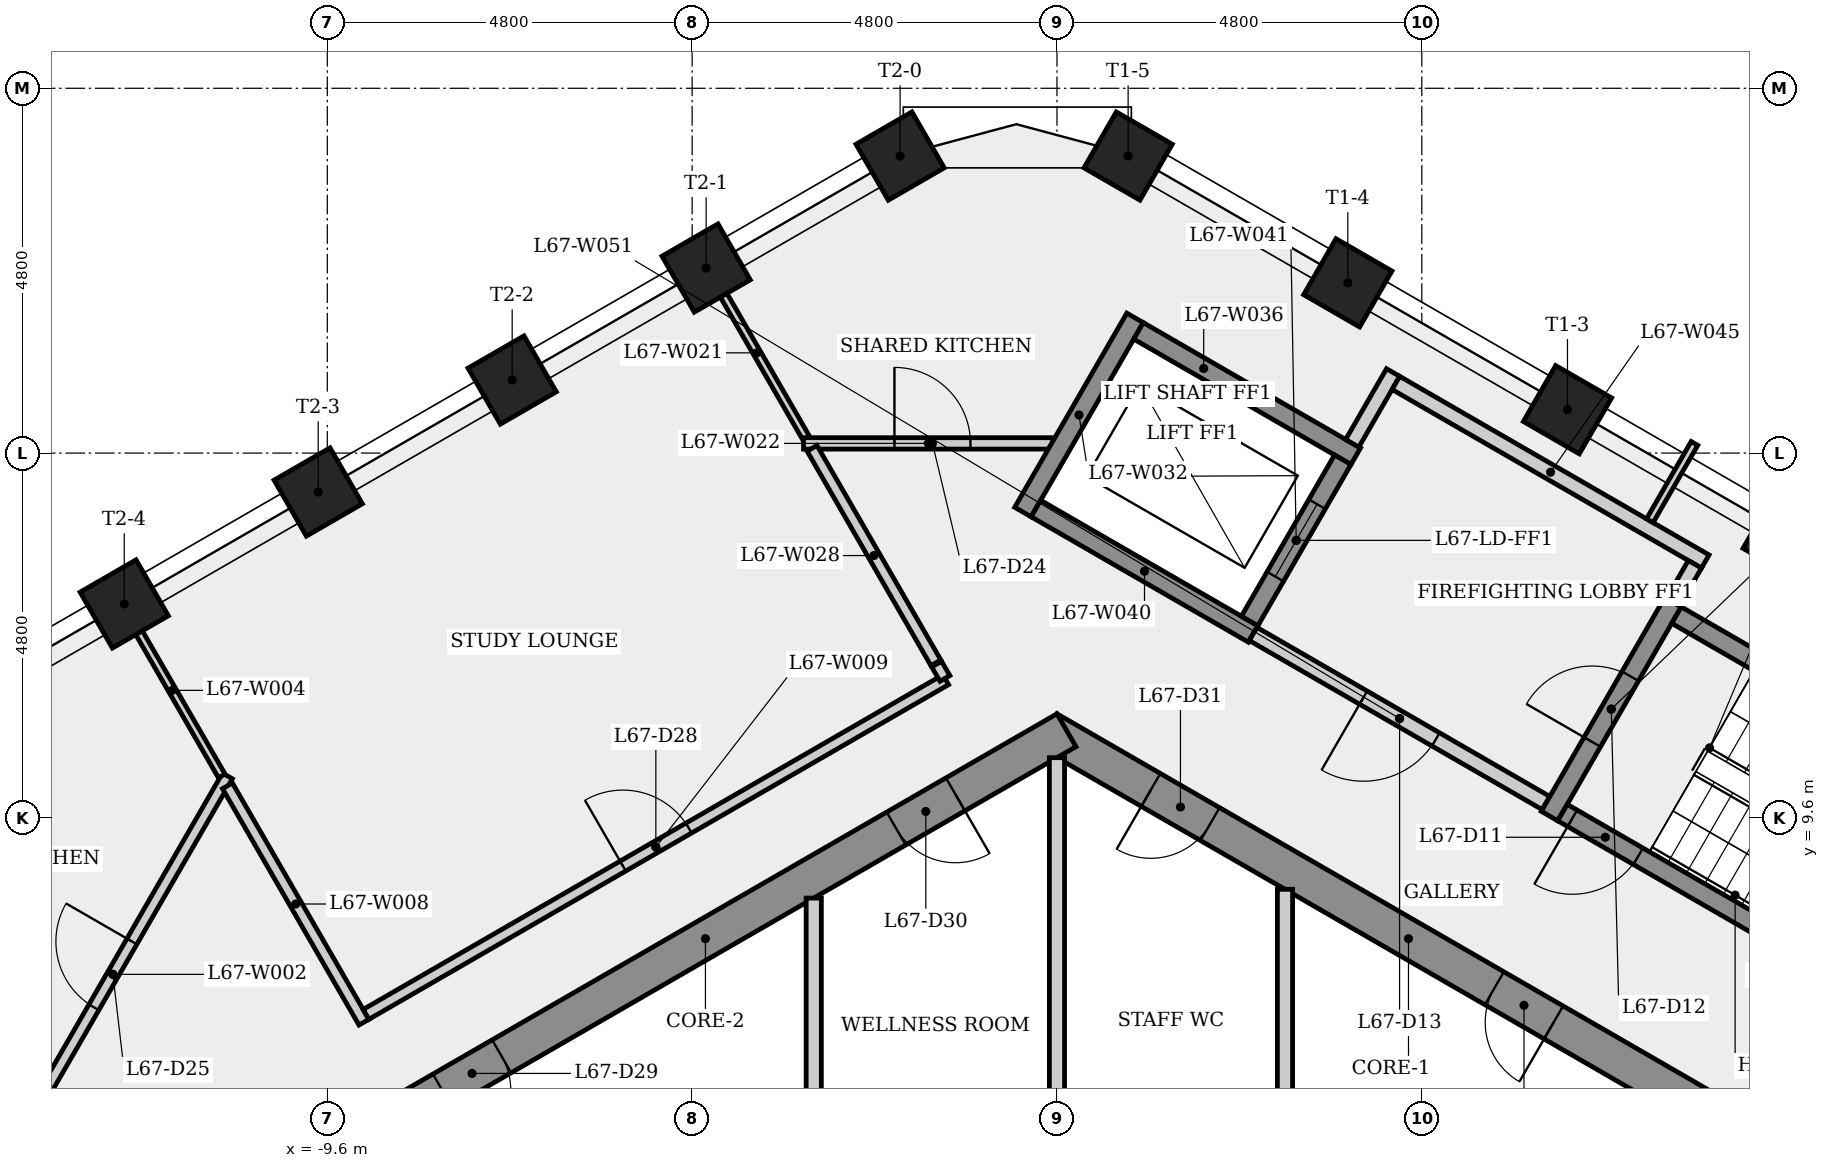
"""IFC4 building model, lengths in metres.
Left out: names, types, materials, properties, quantities, classifications, styles, units other than length and angle.
Written with IfcOpenShell. Run it as: python <this file> out.ifc"""

import sys

from ifc_helpers import new_model, si_unit, direction, frame, frame_2d, origin, origin_2d, place, context, subcontext, project, spatial, rectangle, extrude, element, fill, save


model = new_model("IFC4")
c1 = context("Model", 3, precision=1e-05, world=origin(), true_north=direction((0.0, 1.0)))
c2 = subcontext(c1, "Body", "Model", "MODEL_VIEW")
j1 = project(units=[si_unit("LENGTHUNIT", "METRE"), si_unit("PLANEANGLEUNIT", "RADIAN")], contexts=[c1])
p1 = place(None, origin())
s1 = spatial("IfcSite", under=j1, at=p1, CompositionType="ELEMENT")
p2 = place(p1, origin())
s2 = spatial("IfcBuilding", under=s1, at=p2, CompositionType="ELEMENT")
p3 = place(p2, frame((0.0, 0.0, 249.5)))
s3 = spatial("IfcBuildingStorey", under=s2, at=p3, CompositionType="ELEMENT", Elevation=249.5)
p4 = place(p3, frame((9.375, 5.268, 0.0), z_axis=(0.0, 0.0, 1.0), x_axis=(-0.866023993627, 0.500002442456, 0.0)))
e1 = element("IfcWall", 1, at=p4, inside=s3, PredefinedType="SHEAR", context=c2, shape_type="SweptSolid", body=[
    extrude(rectangle(XDim=10.97, YDim=0.5, at=frame_2d((5.485, 0.0))), origin(), (0.0, 0.0, 1.0), 3.4),
])
p5 = place(p4, frame((8.5, 0.0, 0.0)))
e2 = element("IfcOpeningElement", 2, at=p5, cuts=e1, PredefinedType="OPENING", context=c2, shape_type="SweptSolid", body=[
    extrude(rectangle(XDim=0.9, YDim=2.1, at=frame_2d((0.45, 1.05))), frame((0.0, 0.26, 0.0), z_axis=(0.0, -1.0, 0.0), x_axis=(1.0, 0.0, 0.0)), (0.0, 0.0, 1.0), 0.52),
])
p6 = place(p4, frame((3.28, 0.0, 0.0)))
e3 = element("IfcOpeningElement", 3, at=p6, cuts=e1, PredefinedType="OPENING", context=c2, shape_type="SweptSolid", body=[
    extrude(rectangle(XDim=0.9, YDim=2.1, at=frame_2d((0.45, 1.05))), frame((0.0, 0.26, 0.0), z_axis=(0.0, -1.0, 0.0), x_axis=(1.0, 0.0, 0.0)), (0.0, 0.0, 1.0), 0.52),
])
p7 = place(p3, frame((0.125, 10.753, 0.0), z_axis=(0.0, 0.0, 1.0), x_axis=(-0.866023993627, -0.500002442456, 0.0)))
e4 = element("IfcWall", 4, at=p7, inside=s3, PredefinedType="SHEAR", context=c2, shape_type="SweptSolid", body=[
    extrude(rectangle(XDim=10.97, YDim=0.5, at=frame_2d((5.485, 0.0))), origin(), (0.0, 0.0, 1.0), 3.4),
])
p8 = place(p7, frame((8.581, 0.0, 0.0)))
e5 = element("IfcOpeningElement", 5, at=p8, cuts=e4, PredefinedType="OPENING", context=c2, shape_type="SweptSolid", body=[
    extrude(rectangle(XDim=0.9, YDim=2.1, at=frame_2d((0.45, 1.05))), frame((0.0, 0.26, 0.0), z_axis=(0.0, -1.0, 0.0), x_axis=(1.0, 0.0, 0.0)), (0.0, 0.0, 1.0), 0.52),
])
p9 = place(p7, frame((1.687, 0.0, 0.0)))
e6 = element("IfcOpeningElement", 6, at=p9, cuts=e4, PredefinedType="OPENING", context=c2, shape_type="SweptSolid", body=[
    extrude(rectangle(XDim=0.9, YDim=2.1, at=frame_2d((0.45, 1.05))), frame((0.0, 0.26, 0.0), z_axis=(0.0, -1.0, 0.0), x_axis=(1.0, 0.0, 0.0)), (0.0, 0.0, 1.0), 0.52),
])
for number, where, z_axis, x_axis in (
    (7, (9.607, 13.302, 0.0), (0.0, 0.0, 1.0), (0.5, 0.866, 0.0)),
    (8, (6.717, 14.971, 0.0), (0.0, 0.0, 1.0), (0.5, 0.866, 0.0)),
    (9, (3.826, 16.64, 0.0), (0.0, 0.0, 1.0), (0.5, 0.866, 0.0)),
    (10, (0.936, 18.308, 0.0), (0.0, 0.0, 1.0), (0.5, 0.866, 0.0)),
    (11, (-2.064, 18.308, 0.0), (0.0, 0.0, 1.0), (-0.5, 0.866, 0.0)),
    (12, (-4.616, 16.835, 0.0), (0.0, 0.0, 1.0), (-0.5, 0.866, 0.0)),
    (13, (-7.168, 15.362, 0.0), (0.0, 0.0, 1.0), (-0.5, 0.866, 0.0)),
    (14, (-9.72, 13.888, 0.0), (0.0, 0.0, 1.0), (-0.5, 0.866, 0.0)),
    (15, (-12.272, 12.415, 0.0), (0.0, 0.0, 1.0), (-0.5, 0.866, 0.0)),
):
    element("IfcColumn", number, at=place(p3, frame(where, z_axis=z_axis, x_axis=x_axis)), inside=s3, PredefinedType="COLUMN", context=c2, shape_type="SweptSolid", body=[
        extrude(rectangle(XDim=0.85, YDim=0.85, at=origin_2d()), origin(), (0.0, 0.0, 1.0), 3.4),
    ])
p10 = place(p3, frame((-13.928, 4.931, 0.0), z_axis=(0.0, 0.0, 1.0), x_axis=(0.499980697609, 0.866036547738, 0.0)))
e16 = element("IfcWall", 16, at=p10, inside=s3, PredefinedType="PARTITIONING", context=c2, shape_type="SweptSolid", body=[
    extrude(rectangle(XDim=6.029, YDim=0.15, at=frame_2d((3.014, 0.0))), origin(), (0.0, 0.0, 1.0), 3.0),
])
p11 = place(p10, frame((2.514, 0.0, 0.0)))
e17 = element("IfcOpeningElement", 17, at=p11, cuts=e16, PredefinedType="OPENING", context=c2, shape_type="SweptSolid", body=[
    extrude(rectangle(XDim=1.0, YDim=2.1, at=frame_2d((0.5, 1.05))), frame((0.0, 0.085, 0.0), z_axis=(0.0, -1.0, 0.0), x_axis=(1.0, 0.0, 0.0)), (0.0, 0.0, 1.0), 0.17),
])
p12 = place(p3, frame((-12.29, 12.405, 0.0), z_axis=(0.0, 0.0, 1.0), x_axis=(0.500055541894, -0.865993334282, 0.0)))
e18 = element("IfcWall", 18, at=p12, inside=s3, PredefinedType="PARTITIONING", context=c2, shape_type="SweptSolid", body=[
    extrude(rectangle(XDim=2.601, YDim=0.1, at=frame_2d((1.301, 0.0))), origin(), (0.0, 0.0, 1.0), 3.0),
])
p13 = place(p3, frame((-10.914, 10.022, 0.0), z_axis=(0.0, 0.0, 1.0), x_axis=(0.499955890556, -0.866050868886, 0.0)))
e19 = element("IfcWall", 19, at=p13, inside=s3, PredefinedType="PARTITIONING", context=c2, shape_type="SweptSolid", body=[
    extrude(rectangle(XDim=3.591, YDim=0.15, at=frame_2d((1.795, 0.0))), origin(), (0.0, 0.0, 1.0), 3.0),
])
p14 = place(p3, frame((-9.091, 7.014, 0.0), z_axis=(0.0, 0.0, 1.0), x_axis=(0.866035548006, 0.499982429281, 0.0)))
e20 = element("IfcWall", 20, at=p14, inside=s3, PredefinedType="PARTITIONING", context=c2, shape_type="SweptSolid", body=[
    extrude(rectangle(XDim=8.806, YDim=0.15, at=frame_2d((4.403, 0.0))), origin(), (0.0, 0.0, 1.0), 3.0),
])
p15 = place(p14, frame((3.903, 0.0, 0.0)))
e21 = element("IfcOpeningElement", 21, at=p15, cuts=e20, PredefinedType="OPENING", context=c2, shape_type="SweptSolid", body=[
    extrude(rectangle(XDim=1.0, YDim=2.1, at=frame_2d((0.5, 1.05))), frame((0.0, 0.085, 0.0), z_axis=(0.0, -1.0, 0.0), x_axis=(1.0, 0.0, 0.0)), (0.0, 0.0, 1.0), 0.17),
])
p16 = place(p3, frame((-3.297, 14.593, 0.0), z_axis=(0.0, 0.0, 1.0), x_axis=(-0.499944513011, 0.866057436843, 0.0)))
e22 = element("IfcWall", 22, at=p16, inside=s3, PredefinedType="PARTITIONING", context=c2, shape_type="SweptSolid", body=[
    extrude(rectangle(XDim=2.601, YDim=0.1, at=frame_2d((1.301, 0.0))), origin(), (0.0, 0.0, 1.0), 3.0),
])
p17 = place(p3, frame((-3.335, 14.528, 0.0), z_axis=(0.0, 0.0, 1.0), x_axis=(1.0, 0.0, 0.0)))
e23 = element("IfcWall", 23, at=p17, inside=s3, PredefinedType="PARTITIONING", context=c2, shape_type="SweptSolid", body=[
    extrude(rectangle(XDim=3.283, YDim=0.15, at=frame_2d((1.642, 0.0))), origin(), (0.0, 0.0, 1.0), 3.0),
])
p18 = place(p17, frame((1.197, 0.0, 0.0)))
e24 = element("IfcOpeningElement", 24, at=p18, cuts=e23, PredefinedType="OPENING", context=c2, shape_type="SweptSolid", body=[
    extrude(rectangle(XDim=1.0, YDim=2.1, at=frame_2d((0.5, 1.05))), frame((0.0, 0.085, 0.0), z_axis=(0.0, -1.0, 0.0), x_axis=(1.0, 0.0, 0.0)), (0.0, 0.0, 1.0), 0.17),
])
p19 = place(p3, frame((-3.2, 8.545, 0.0), z_axis=(0.0, 0.0, 1.0), x_axis=(0.0, -1.0, 0.0)))
e25 = element("IfcWall", 25, at=p19, inside=s3, PredefinedType="PARTITIONING", context=c2, shape_type="SweptSolid", body=[
    extrude(rectangle(XDim=3.27, YDim=0.2, at=frame_2d((1.635, 0.0))), origin(), (0.0, 0.0, 1.0), 3.0),
])
p20 = place(p3, frame((-1.593, 11.641, 0.0), z_axis=(0.0, 0.0, 1.0), x_axis=(-0.500022939057, 0.866012159509, 0.0)))
e26 = element("IfcWall", 26, at=p20, inside=s3, PredefinedType="PARTITIONING", context=c2, shape_type="SweptSolid", body=[
    extrude(rectangle(XDim=3.259, YDim=0.15, at=frame_2d((1.629, 0.0))), origin(), (0.0, 0.0, 1.0), 3.0),
])
p21 = place(p3, frame((-1.583, 11.623, 0.0), z_axis=(0.0, 0.0, 1.0), x_axis=(0.500240224089, -0.865886665912, 0.0)))
e27 = element("IfcWall", 27, at=p21, inside=s3, PredefinedType="PARTITIONING", context=c2, shape_type="SweptSolid", body=[
    extrude(rectangle(XDim=0.218, YDim=0.15, at=frame_2d((0.109, 0.0))), origin(), (0.0, 0.0, 1.0), 3.0),
])
p22 = place(p3, frame((-0.448, 13.624, 0.0), z_axis=(0.0, 0.0, 1.0), x_axis=(0.500037662692, 0.866003658127, 0.0)))
e28 = element("IfcWall", 28, at=p22, inside=s3, PredefinedType="SHEAR", context=c2, shape_type="SweptSolid", body=[
    extrude(rectangle(XDim=2.95, YDim=0.25, at=frame_2d((1.475, 0.0))), origin(), (0.0, 0.0, 1.0), 3.0),
])
p23 = place(p3, frame((0.0, 10.392, 0.0), z_axis=(0.0, 0.0, 1.0), x_axis=(0.0, -1.0, 0.0)))
e29 = element("IfcWall", 29, at=p23, inside=s3, PredefinedType="PARTITIONING", context=c2, shape_type="SweptSolid", body=[
    extrude(rectangle(XDim=5.117, YDim=0.2, at=frame_2d((2.559, 0.0))), origin(), (0.0, 0.0, 1.0), 3.0),
])
for number, where, z_axis, x_axis in (
    (30, (1.073, 16.008, 0.0), (0.0, 0.0, 1.0), (0.866, -0.5, 0.0)),
    (31, (2.581, 12.02, 0.0), (0.0, 0.0, 1.0), (-0.866, 0.5, 0.0)),
):
    element("IfcWall", number, at=place(p3, frame(where, z_axis=z_axis, x_axis=x_axis)), inside=s3, PredefinedType="SHEAR", context=c2, shape_type="SweptSolid", body=[
        extrude(rectangle(XDim=3.3, YDim=0.25, at=frame_2d((1.65, 0.0))), origin(), (0.0, 0.0, 1.0), 3.0),
    ])
p24 = place(p3, frame((2.535, 12.191, 0.0), z_axis=(0.0, 0.0, 1.0), x_axis=(0.500061746146, 0.865989751695, 0.0)))
e32 = element("IfcWall", 32, at=p24, inside=s3, PredefinedType="SHEAR", context=c2, shape_type="SweptSolid", body=[
    extrude(rectangle(XDim=2.45, YDim=0.25, at=frame_2d((1.225, 0.0))), origin(), (0.0, 0.0, 1.0), 3.4),
])
p25 = place(p24, frame((0.675, 0.0, 0.0)))
e33 = element("IfcOpeningElement", 33, at=p25, cuts=e32, PredefinedType="OPENING", context=c2, shape_type="SweptSolid", body=[
    extrude(rectangle(XDim=1.1, YDim=2.1, at=frame_2d((0.55, 1.05))), frame((0.0, 0.135, 0.0), z_axis=(0.0, -1.0, 0.0), x_axis=(1.0, 0.0, 0.0)), (0.0, 0.0, 1.0), 0.27),
])
p26 = place(p3, frame((3.0, 8.66, 0.0), z_axis=(0.0, 0.0, 1.0), x_axis=(0.0, -1.0, 0.0)))
e34 = element("IfcWall", 34, at=p26, inside=s3, PredefinedType="PARTITIONING", context=c2, shape_type="SweptSolid", body=[
    extrude(rectangle(XDim=3.385, YDim=0.2, at=frame_2d((1.693, 0.0))), origin(), (0.0, 0.0, 1.0), 3.0),
])
p27 = place(p3, frame((3.885, 14.529, 0.0), z_axis=(0.0, 0.0, 1.0), x_axis=(0.499997628298, 0.866026773083, 0.0)))
e35 = element("IfcWall", 35, at=p27, inside=s3, PredefinedType="PARTITIONING", context=c2, shape_type="SweptSolid", body=[
    extrude(rectangle(XDim=1.075, YDim=0.2, at=frame_2d((0.538, 0.0))), origin(), (0.0, 0.0, 1.0), 3.0),
])
p28 = place(p3, frame((4.459, 15.323, 0.0), z_axis=(0.0, 0.0, 1.0), x_axis=(0.866016039709, -0.500016218704, 0.0)))
e36 = element("IfcWall", 36, at=p28, inside=s3, PredefinedType="PARTITIONING", context=c2, shape_type="SweptSolid", body=[
    extrude(rectangle(XDim=4.7, YDim=0.2, at=frame_2d((2.35, 0.0))), origin(), (0.0, 0.0, 1.0), 3.0),
])
p29 = place(p3, frame((6.435, 9.795, 0.0), z_axis=(0.0, 0.0, 1.0), x_axis=(-0.866012907634, 0.500021643343, 0.0)))
e37 = element("IfcWall", 37, at=p29, inside=s3, PredefinedType="PARTITIONING", context=c2, shape_type="SweptSolid", body=[
    extrude(rectangle(XDim=4.45, YDim=0.2, at=frame_2d((2.225, 0.0))), origin(), (0.0, 0.0, 1.0), 3.0),
])
p30 = place(p29, frame((1.675, 0.0, 0.0)))
e38 = element("IfcOpeningElement", 38, at=p30, cuts=e37, PredefinedType="OPENING", context=c2, shape_type="SweptSolid", body=[
    extrude(rectangle(XDim=1.1, YDim=2.1, at=frame_2d((0.55, 1.05))), frame((0.0, 0.11, 0.0), z_axis=(0.0, -1.0, 0.0), x_axis=(1.0, 0.0, 0.0)), (0.0, 0.0, 1.0), 0.22),
])
p31 = place(p3, frame((6.48, 9.624, 0.0), z_axis=(0.0, 0.0, 1.0), x_axis=(0.500017246033, 0.866015446554, 0.0)))
e39 = element("IfcWall", 39, at=p31, inside=s3, PredefinedType="SHEAR", context=c2, shape_type="SweptSolid", body=[
    extrude(rectangle(XDim=3.25, YDim=0.25, at=frame_2d((1.625, 0.0))), origin(), (0.0, 0.0, 1.0), 3.0),
])
p32 = place(p31, frame((1.125, 0.0, 0.0)))
e40 = element("IfcOpeningElement", 40, at=p32, cuts=e39, PredefinedType="OPENING", context=c2, shape_type="SweptSolid", body=[
    extrude(rectangle(XDim=1.0, YDim=2.1, at=frame_2d((0.5, 1.05))), frame((0.0, 0.135, 0.0), z_axis=(0.0, -1.0, 0.0), x_axis=(1.0, 0.0, 0.0)), (0.0, 0.0, 1.0), 0.27),
])
p33 = place(p3, frame((7.8, 13.51, 0.0), z_axis=(0.0, 0.0, 1.0), x_axis=(0.499962389866, 0.866047116916, 0.0)))
e41 = element("IfcWall", 41, at=p33, inside=s3, PredefinedType="PARTITIONING", context=c2, shape_type="SweptSolid", body=[
    extrude(rectangle(XDim=1.174, YDim=0.1, at=frame_2d((0.587, 0.0))), origin(), (0.0, 0.0, 1.0), 3.0),
])
p34 = place(p3, frame((8.151, 12.268, 0.0), z_axis=(0.0, 0.0, 1.0), x_axis=(0.866025499775, -0.499999833739, 0.0)))
e42 = element("IfcWall", 42, at=p34, inside=s3, PredefinedType="SHEAR", context=c2, shape_type="SweptSolid", body=[
    extrude(rectangle(XDim=6.4, YDim=0.25, at=frame_2d((3.2, 0.0))), origin(), (0.0, 0.0, 1.0), 3.0),
])
p35 = place(p3, frame((8.393, 12.937, 0.0), z_axis=(0.0, 0.0, 1.0), x_axis=(-0.500065409566, -0.86598763626, 0.0)))
e43 = element("IfcWall", 43, at=p35, inside=s3, PredefinedType="PARTITIONING", context=c2, shape_type="SweptSolid", body=[
    extrude(rectangle(XDim=0.575, YDim=0.2, at=frame_2d((0.288, 0.0))), origin(), (0.0, 0.0, 1.0), 3.0),
])
p36 = place(p3, frame((12.194, 6.47, 0.0), z_axis=(0.0, 0.0, 1.0), x_axis=(-0.866025499775, 0.499999833739, 0.0)))
e44 = element("IfcWall", 44, at=p36, inside=s3, PredefinedType="SHEAR", context=c2, shape_type="SweptSolid", body=[
    extrude(rectangle(XDim=6.4, YDim=0.25, at=frame_2d((3.2, 0.0))), origin(), (0.0, 0.0, 1.0), 3.0),
])
p37 = place(p36, frame((5.25, 0.0, 0.0)))
e45 = element("IfcOpeningElement", 45, at=p37, cuts=e44, PredefinedType="OPENING", context=c2, shape_type="SweptSolid", body=[
    extrude(rectangle(XDim=1.0, YDim=2.1, at=frame_2d((0.5, 1.05))), frame((0.0, 0.135, 0.0), z_axis=(0.0, -1.0, 0.0), x_axis=(1.0, 0.0, 0.0)), (0.0, 0.0, 1.0), 0.27),
])
p38 = place(p37, origin())
e46 = element("IfcDoor", 46, at=p38, inside=s3, OperationType="SINGLE_SWING_RIGHT", PredefinedType="DOOR", context=c2, shape_type="SweptSolid", body=[
    extrude(rectangle(XDim=1.0, YDim=2.1, at=frame_2d((0.5, 1.05))), frame((0.0, 0.025, 0.0), z_axis=(0.0, -1.0, 0.0), x_axis=(1.0, 0.0, 0.0)), (0.0, 0.0, 1.0), 0.05),
])
fill(e45, e46)
p39 = place(p32, origin())
e47 = element("IfcDoor", 47, at=p39, inside=s3, OperationType="SINGLE_SWING_LEFT", PredefinedType="DOOR", context=c2, shape_type="SweptSolid", body=[
    extrude(rectangle(XDim=1.0, YDim=2.1, at=frame_2d((0.5, 1.05))), frame((0.0, 0.025, 0.0), z_axis=(0.0, -1.0, 0.0), x_axis=(1.0, 0.0, 0.0)), (0.0, 0.0, 1.0), 0.05),
])
fill(e40, e47)
p40 = place(p30, origin())
e48 = element("IfcDoor", 48, at=p40, inside=s3, OperationType="SINGLE_SWING_RIGHT", PredefinedType="DOOR", context=c2, shape_type="SweptSolid", body=[
    extrude(rectangle(XDim=1.1, YDim=2.1, at=frame_2d((0.55, 1.05))), frame((0.0, 0.025, 0.0), z_axis=(0.0, -1.0, 0.0), x_axis=(1.0, 0.0, 0.0)), (0.0, 0.0, 1.0), 0.05),
])
fill(e38, e48)
p41 = place(p25, origin())
e49 = element("IfcDoor", 49, at=p41, inside=s3, OperationType="SLIDING_TO_LEFT", PredefinedType="DOOR", context=c2, shape_type="SweptSolid", body=[
    extrude(rectangle(XDim=1.1, YDim=2.1, at=frame_2d((0.55, 1.05))), frame((0.0, 0.025, 0.0), z_axis=(0.0, -1.0, 0.0), x_axis=(1.0, 0.0, 0.0)), (0.0, 0.0, 1.0), 0.05),
])
fill(e33, e49)
p42 = place(p18, origin())
e50 = element("IfcDoor", 50, at=p42, inside=s3, OperationType="SINGLE_SWING_LEFT", PredefinedType="DOOR", context=c2, shape_type="SweptSolid", body=[
    extrude(rectangle(XDim=1.0, YDim=2.1, at=frame_2d((0.5, 1.05))), frame((0.0, 0.025, 0.0), z_axis=(0.0, -1.0, 0.0), x_axis=(1.0, 0.0, 0.0)), (0.0, 0.0, 1.0), 0.05),
])
fill(e24, e50)
p43 = place(p11, origin())
e51 = element("IfcDoor", 51, at=p43, inside=s3, OperationType="SINGLE_SWING_RIGHT", PredefinedType="DOOR", context=c2, shape_type="SweptSolid", body=[
    extrude(rectangle(XDim=1.0, YDim=2.1, at=frame_2d((0.5, 1.05))), frame((0.0, 0.025, 0.0), z_axis=(0.0, -1.0, 0.0), x_axis=(1.0, 0.0, 0.0)), (0.0, 0.0, 1.0), 0.05),
])
fill(e17, e51)
p44 = place(p15, origin())
e52 = element("IfcDoor", 52, at=p44, inside=s3, OperationType="SINGLE_SWING_LEFT", PredefinedType="DOOR", context=c2, shape_type="SweptSolid", body=[
    extrude(rectangle(XDim=1.0, YDim=2.1, at=frame_2d((0.5, 1.05))), frame((0.0, 0.025, 0.0), z_axis=(0.0, -1.0, 0.0), x_axis=(1.0, 0.0, 0.0)), (0.0, 0.0, 1.0), 0.05),
])
fill(e21, e52)
p45 = place(p8, origin())
e53 = element("IfcDoor", 53, at=p45, inside=s3, OperationType="SINGLE_SWING_RIGHT", PredefinedType="DOOR", context=c2, shape_type="SweptSolid", body=[
    extrude(rectangle(XDim=0.9, YDim=2.1, at=frame_2d((0.45, 1.05))), frame((0.0, 0.025, 0.0), z_axis=(0.0, -1.0, 0.0), x_axis=(1.0, 0.0, 0.0)), (0.0, 0.0, 1.0), 0.05),
])
fill(e5, e53)
p46 = place(p9, origin())
e54 = element("IfcDoor", 54, at=p46, inside=s3, OperationType="SINGLE_SWING_LEFT", PredefinedType="DOOR", context=c2, shape_type="SweptSolid", body=[
    extrude(rectangle(XDim=0.9, YDim=2.1, at=frame_2d((0.45, 1.05))), frame((0.0, 0.025, 0.0), z_axis=(0.0, -1.0, 0.0), x_axis=(1.0, 0.0, 0.0)), (0.0, 0.0, 1.0), 0.05),
])
fill(e6, e54)
p47 = place(p5, origin())
e55 = element("IfcDoor", 55, at=p47, inside=s3, OperationType="SINGLE_SWING_RIGHT", PredefinedType="DOOR", context=c2, shape_type="SweptSolid", body=[
    extrude(rectangle(XDim=0.9, YDim=2.1, at=frame_2d((0.45, 1.05))), frame((0.0, 0.025, 0.0), z_axis=(0.0, -1.0, 0.0), x_axis=(1.0, 0.0, 0.0)), (0.0, 0.0, 1.0), 0.05),
])
fill(e2, e55)
p48 = place(p6, origin())
e56 = element("IfcDoor", 56, at=p48, inside=s3, OperationType="SINGLE_SWING_LEFT", PredefinedType="DOOR", context=c2, shape_type="SweptSolid", body=[
    extrude(rectangle(XDim=0.9, YDim=2.1, at=frame_2d((0.45, 1.05))), frame((0.0, 0.025, 0.0), z_axis=(0.0, -1.0, 0.0), x_axis=(1.0, 0.0, 0.0)), (0.0, 0.0, 1.0), 0.05),
])
fill(e3, e56)
save(model, sys.argv[1])
